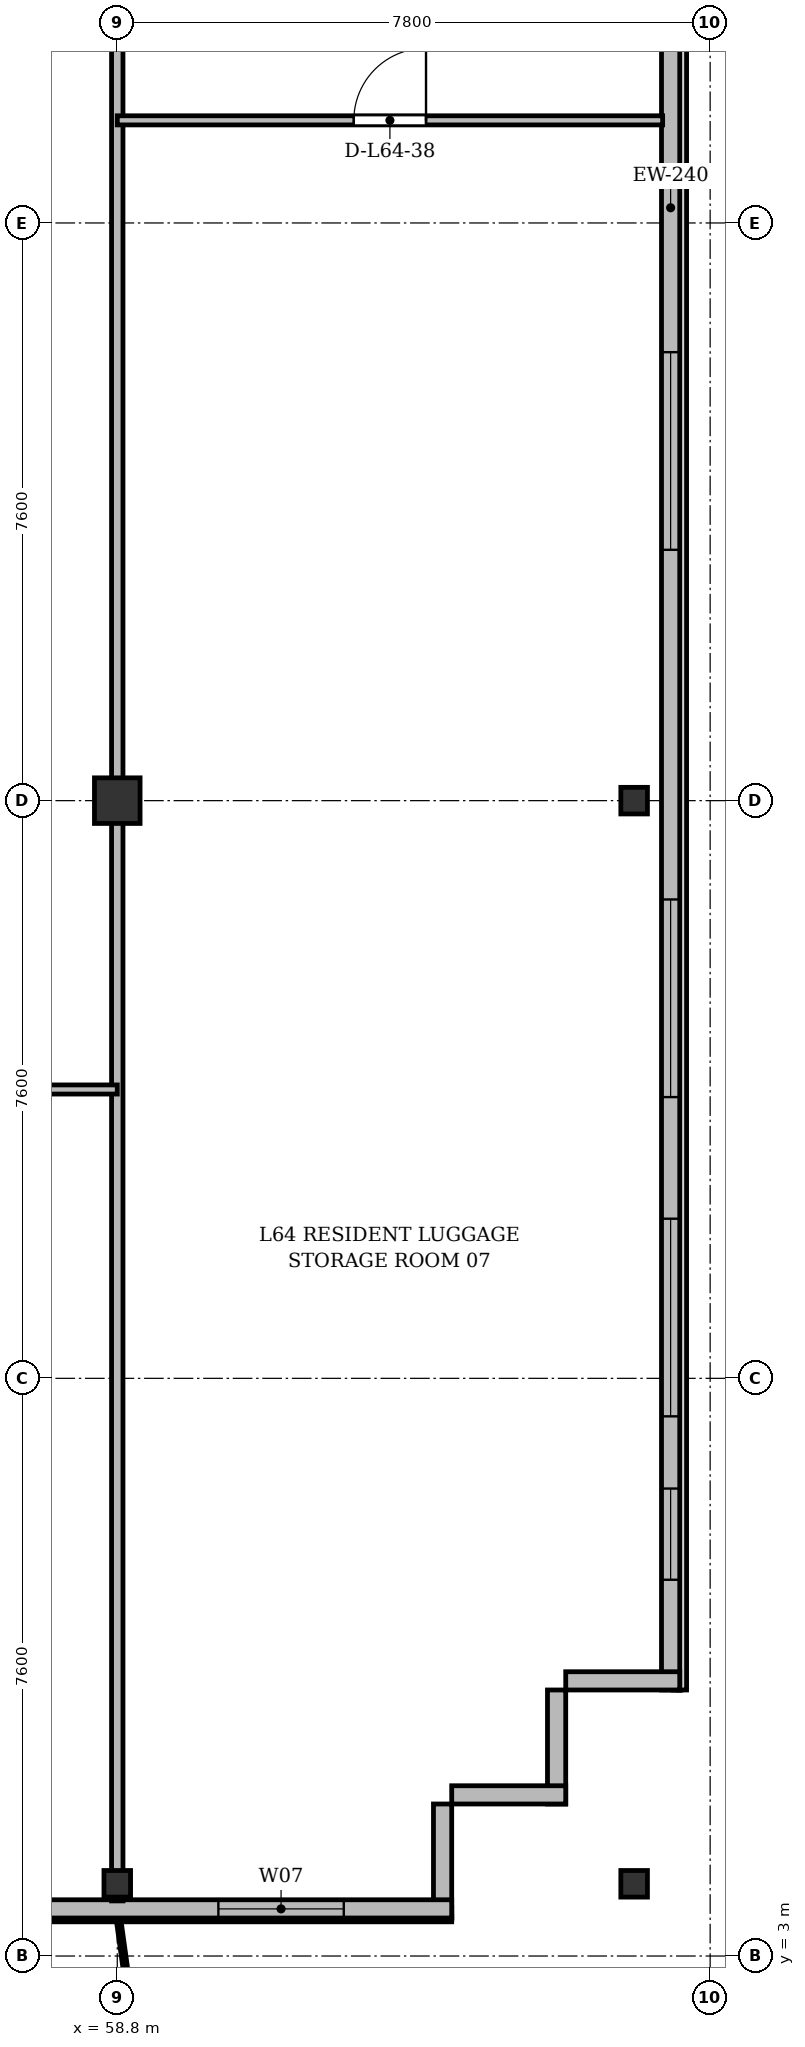
"""IFC4 building model, lengths in metres.
Left out: names, types, materials, properties, quantities, classifications, styles, units other than length and angle.
Written with IfcOpenShell. Run it as: python <this file> out.ifc"""

import sys

from ifc_helpers import new_model, si_unit, direction, frame, frame_2d, origin, origin_2d, place, context, subcontext, project, spatial, rectangle, i_section, extrude, source, transform, mapped, element, fill, save


model = new_model("IFC4")
c1 = context("Model", 3, precision=1e-05, world=origin(), true_north=direction((0.0, 1.0)))
c2 = subcontext(c1, "Body", "Model", "MODEL_VIEW")
j1 = project(units=[si_unit("LENGTHUNIT", "METRE"), si_unit("PLANEANGLEUNIT", "RADIAN")], contexts=[c1])
p1 = place(None, origin())
s1 = spatial("IfcSite", under=j1, at=p1, CompositionType="ELEMENT")
p2 = place(p1, origin())
s2 = spatial("IfcBuilding", under=s1, at=p2, CompositionType="ELEMENT")
p3 = place(p2, frame((0.0, 0.0, 248.7)))
s3 = spatial("IfcBuildingStorey", under=s2, at=p3, CompositionType="ELEMENT", Elevation=248.7)
m1 = source(origin(), c2, "Body", "SweptSolid", [
    extrude(i_section(OverallWidth=0.35, OverallDepth=0.35, WebThickness=0.018, FlangeThickness=0.028, at=origin_2d()), origin(), (0.0, 0.0, 1.0), 3.6),
])
p4 = place(p3, frame((58.8, 3.95, 0.0), z_axis=(0.0, 0.0, 1.0), x_axis=(1.0, 0.0, 0.0)))
e1 = element("IfcColumn", 1, at=p4, inside=s3, PredefinedType="COLUMN", context=c2, shape_type="MappedRepresentation", body=[
    mapped(m1, transform((0.0, 0.0, 0.0), x_axis=(1.0, 0.0, 0.0), y_axis=(0.0, 1.0, 0.0), z_axis=(0.0, 0.0, 1.0), scale=1.0)),
])
m2 = source(origin(), c2, "Body", "SweptSolid", [
    extrude(rectangle(XDim=0.6, YDim=0.6, at=origin_2d()), origin(), (0.0, 0.0, 1.0), 3.6),
])
p5 = place(p3, frame((58.8, 18.2, 0.0), z_axis=(0.0, 0.0, 1.0), x_axis=(1.0, 0.0, 0.0)))
e2 = element("IfcColumn", 2, at=p5, inside=s3, PredefinedType="COLUMN", context=c2, shape_type="MappedRepresentation", body=[
    mapped(m2, transform((0.0, 0.0, 0.0), x_axis=(1.0, 0.0, 0.0), y_axis=(0.0, 1.0, 0.0), z_axis=(0.0, 0.0, 1.0), scale=1.0)),
])
for number, where, z_axis, x_axis in (
    (3, (65.6, 3.95, 0.0), (0.0, 0.0, 1.0), (1.0, 0.0, 0.0)),
    (4, (65.6, 18.2, 0.0), (0.0, 0.0, 1.0), (1.0, 0.0, 0.0)),
):
    element("IfcColumn", number, at=place(p3, frame(where, z_axis=z_axis, x_axis=x_axis)), inside=s3, PredefinedType="COLUMN", context=c2, shape_type="MappedRepresentation", body=[
        mapped(m1, transform((0.0, 0.0, 0.0), x_axis=(1.0, 0.0, 0.0), y_axis=(0.0, 1.0, 0.0), z_axis=(0.0, 0.0, 1.0), scale=1.0)),
    ])
p6 = place(p3, frame((66.08, 45.5, 0.0), z_axis=(0.0, 0.0, 1.0), x_axis=(0.0, -1.0, 0.0)))
e5 = element("IfcWall", 5, at=p6, inside=s3, PredefinedType="SOLIDWALL", context=c2, shape_type="SweptSolid", body=[
    extrude(rectangle(XDim=39.0, YDim=0.24, at=frame_2d((19.5, 0.0))), origin(), (0.0, 0.0, 1.0), 3.37),
])
p7 = place(p6, frame((36.35, 0.0, 0.92)))
e6 = element("IfcOpeningElement", 6, at=p7, cuts=e5, PredefinedType="OPENING", context=c2, shape_type="SweptSolid", body=[
    extrude(rectangle(XDim=1.2, YDim=1.65, at=frame_2d((0.6, 0.825))), frame((0.0, 0.13, 0.0), z_axis=(0.0, -1.0, 0.0), x_axis=(1.0, 0.0, 0.0)), (0.0, 0.0, 1.0), 0.26),
])
p8 = place(p6, frame((32.8, 0.0, 0.92)))
e7 = element("IfcOpeningElement", 7, at=p8, cuts=e5, PredefinedType="OPENING", context=c2, shape_type="SweptSolid", body=[
    extrude(rectangle(XDim=2.6, YDim=1.9, at=frame_2d((1.3, 0.95))), frame((0.0, 0.13, 0.0), z_axis=(0.0, -1.0, 0.0), x_axis=(1.0, 0.0, 0.0)), (0.0, 0.0, 1.0), 0.26),
])
p9 = place(p6, frame((28.6, 0.0, 0.92)))
e8 = element("IfcOpeningElement", 8, at=p9, cuts=e5, PredefinedType="OPENING", context=c2, shape_type="SweptSolid", body=[
    extrude(rectangle(XDim=2.6, YDim=1.9, at=frame_2d((1.3, 0.95))), frame((0.0, 0.13, 0.0), z_axis=(0.0, -1.0, 0.0), x_axis=(1.0, 0.0, 0.0)), (0.0, 0.0, 1.0), 0.26),
])
p10 = place(p6, frame((21.4, 0.0, 0.92)))
e9 = element("IfcOpeningElement", 9, at=p10, cuts=e5, PredefinedType="OPENING", context=c2, shape_type="SweptSolid", body=[
    extrude(rectangle(XDim=2.6, YDim=1.9, at=frame_2d((1.3, 0.95))), frame((0.0, 0.13, 0.0), z_axis=(0.0, -1.0, 0.0), x_axis=(1.0, 0.0, 0.0)), (0.0, 0.0, 1.0), 0.26),
])
p11 = place(p6, frame((7.4, 0.0, 0.92)))
e10 = element("IfcOpeningElement", 10, at=p11, cuts=e5, PredefinedType="OPENING", context=c2, shape_type="SweptSolid", body=[
    extrude(rectangle(XDim=2.6, YDim=1.9, at=frame_2d((1.3, 0.95))), frame((0.0, 0.13, 0.0), z_axis=(0.0, -1.0, 0.0), x_axis=(1.0, 0.0, 0.0)), (0.0, 0.0, 1.0), 0.26),
])
p12 = place(p6, frame((4.5, 0.0, 0.92)))
e11 = element("IfcOpeningElement", 11, at=p12, cuts=e5, PredefinedType="OPENING", context=c2, shape_type="SweptSolid", body=[
    extrude(rectangle(XDim=1.2, YDim=1.65, at=frame_2d((0.6, 0.825))), frame((0.0, 0.13, 0.0), z_axis=(0.0, -1.0, 0.0), x_axis=(1.0, 0.0, 0.0)), (0.0, 0.0, 1.0), 0.26),
])
p13 = place(p6, frame((1.15, 0.0, 0.92)))
e12 = element("IfcOpeningElement", 12, at=p13, cuts=e5, PredefinedType="OPENING", context=c2, shape_type="SweptSolid", body=[
    extrude(rectangle(XDim=1.2, YDim=1.65, at=frame_2d((0.6, 0.825))), frame((0.0, 0.13, 0.0), z_axis=(0.0, -1.0, 0.0), x_axis=(1.0, 0.0, 0.0)), (0.0, 0.0, 1.0), 0.26),
])
p14 = place(p3, frame((66.2, 6.62, 0.0), z_axis=(0.0, 0.0, 1.0), x_axis=(-1.0, 0.0, 0.0)))
e13 = element("IfcWall", 13, at=p14, inside=s3, PredefinedType="SOLIDWALL", context=c2, shape_type="SweptSolid", body=[
    extrude(rectangle(XDim=1.5, YDim=0.24, at=frame_2d((0.75, 0.0))), origin(), (0.0, 0.0, 1.0), 2.87),
])
for number, where, z_axis, x_axis in (
    (14, (64.58, 6.5, 0.0), (0.0, 0.0, 1.0), (0.0, -1.0, 0.0)),
    (15, (64.7, 5.12, 0.0), (0.0, 0.0, 1.0), (-1.0, 0.0, 0.0)),
):
    element("IfcWall", number, at=place(p3, frame(where, z_axis=z_axis, x_axis=x_axis)), inside=s3, PredefinedType="SOLIDWALL", context=c2, shape_type="SweptSolid", body=[
        extrude(rectangle(XDim=1.5, YDim=0.24, at=frame_2d((0.75, 0.0))), origin(), (0.0, 0.0, 1.0), 3.37),
    ])
p15 = place(p3, frame((63.08, 5.0, 0.0), z_axis=(0.0, 0.0, 1.0), x_axis=(0.0, -1.0, 0.0)))
e16 = element("IfcWall", 16, at=p15, inside=s3, PredefinedType="SOLIDWALL", context=c2, shape_type="SweptSolid", body=[
    extrude(rectangle(XDim=1.5, YDim=0.24, at=frame_2d((0.75, 0.0))), origin(), (0.0, 0.0, 1.0), 2.92),
])
p16 = place(p3, frame((63.2, 3.62, 0.0), z_axis=(0.0, 0.0, 1.0), x_axis=(-1.0, 0.0, 0.0)))
e17 = element("IfcWall", 17, at=p16, inside=s3, PredefinedType="SOLIDWALL", context=c2, shape_type="SweptSolid", body=[
    extrude(rectangle(XDim=52.0, YDim=0.24, at=frame_2d((26.0, 0.0))), origin(), (0.0, 0.0, 1.0), 3.37),
])
p17 = place(p16, frame((1.42, 0.0, 0.9)))
e18 = element("IfcOpeningElement", 18, at=p17, cuts=e17, PredefinedType="OPENING", context=c2, shape_type="SweptSolid", body=[
    extrude(rectangle(XDim=1.65, YDim=1.85, at=frame_2d((0.825, 0.925))), frame((0.0, 0.13, 0.0), z_axis=(0.0, -1.0, 0.0), x_axis=(1.0, 0.0, 0.0)), (0.0, 0.0, 1.0), 0.26),
])
p18 = place(p16, frame((7.4, 0.0, 0.9)))
e19 = element("IfcOpeningElement", 19, at=p18, cuts=e17, PredefinedType="OPENING", context=c2, shape_type="SweptSolid", body=[
    extrude(rectangle(XDim=1.8, YDim=1.8, at=frame_2d((0.9, 0.9))), frame((0.0, 0.13, 0.0), z_axis=(0.0, -1.0, 0.0), x_axis=(1.0, 0.0, 0.0)), (0.0, 0.0, 1.0), 0.26),
])
p19 = place(p16, frame((14.017, 0.0, 0.0)))
e20 = element("IfcOpeningElement", 20, at=p19, cuts=e17, PredefinedType="OPENING", context=c2, shape_type="SweptSolid", body=[
    extrude(rectangle(XDim=1.2, YDim=2.2, at=frame_2d((0.6, 1.1))), frame((0.0, 0.13, 0.0), z_axis=(0.0, -1.0, 0.0), x_axis=(1.0, 0.0, 0.0)), (0.0, 0.0, 1.0), 0.26),
])
p20 = place(p16, frame((25.25, 0.0, 0.9)))
e21 = element("IfcOpeningElement", 21, at=p20, cuts=e17, PredefinedType="OPENING", context=c2, shape_type="SweptSolid", body=[
    extrude(rectangle(XDim=1.5, YDim=1.75, at=frame_2d((0.75, 0.875))), frame((0.0, 0.13, 0.0), z_axis=(0.0, -1.0, 0.0), x_axis=(1.0, 0.0, 0.0)), (0.0, 0.0, 1.0), 0.26),
])
p21 = place(p16, frame((35.2, 0.0, 0.9)))
e22 = element("IfcOpeningElement", 22, at=p21, cuts=e17, PredefinedType="OPENING", context=c2, shape_type="SweptSolid", body=[
    extrude(rectangle(XDim=2.0, YDim=1.95, at=frame_2d((1.0, 0.975))), frame((0.0, 0.13, 0.0), z_axis=(0.0, -1.0, 0.0), x_axis=(1.0, 0.0, 0.0)), (0.0, 0.0, 1.0), 0.26),
])
p22 = place(p16, frame((45.302, 0.0, 0.0)))
e23 = element("IfcOpeningElement", 23, at=p22, cuts=e17, PredefinedType="OPENING", context=c2, shape_type="SweptSolid", body=[
    extrude(rectangle(XDim=1.2, YDim=2.2, at=frame_2d((0.6, 1.1))), frame((0.0, 0.13, 0.0), z_axis=(0.0, -1.0, 0.0), x_axis=(1.0, 0.0, 0.0)), (0.0, 0.0, 1.0), 0.26),
])
p23 = place(p16, frame((48.855, 0.0, 0.9)))
e24 = element("IfcOpeningElement", 24, at=p23, cuts=e17, PredefinedType="OPENING", context=c2, shape_type="SweptSolid", body=[
    extrude(rectangle(XDim=1.8, YDim=1.8, at=frame_2d((0.9, 0.9))), frame((0.0, 0.13, 0.0), z_axis=(0.0, -1.0, 0.0), x_axis=(1.0, 0.0, 0.0)), (0.0, 0.0, 1.0), 0.26),
])
p24 = place(p3, frame((58.8, 3.725, 0.0), z_axis=(0.0, 0.0, 1.0), x_axis=(0.0, 1.0, 0.0)))
e25 = element("IfcWall", 25, at=p24, inside=s3, PredefinedType="PARTITIONING", context=c2, shape_type="SweptSolid", body=[
    extrude(rectangle(XDim=27.275, YDim=0.15, at=frame_2d((13.637, 0.0))), origin(), (0.0, 0.0, 1.0), 2.87),
])
p25 = place(p3, frame((51.0, 14.4, 0.0), z_axis=(0.0, 0.0, 1.0), x_axis=(1.0, 0.0, 0.0)))
e26 = element("IfcWall", 26, at=p25, inside=s3, PredefinedType="PARTITIONING", context=c2, shape_type="SweptSolid", body=[
    extrude(rectangle(XDim=7.8, YDim=0.12, at=frame_2d((3.9, 0.0))), origin(), (0.0, 0.0, 1.0), 2.87),
])
p26 = place(p25, frame((3.333, 0.0, 0.0)))
e27 = element("IfcOpeningElement", 27, at=p26, cuts=e26, PredefinedType="OPENING", context=c2, shape_type="SweptSolid", body=[
    extrude(rectangle(XDim=0.95, YDim=2.15, at=frame_2d((0.475, 1.075))), frame((0.0, 0.07, 0.0), z_axis=(0.0, -1.0, 0.0), x_axis=(1.0, 0.0, 0.0)), (0.0, 0.0, 1.0), 0.14),
])
p27 = place(p3, frame((58.8, 27.15, 0.0), z_axis=(0.0, 0.0, 1.0), x_axis=(1.0, 0.0, 0.0)))
e28 = element("IfcWall", 28, at=p27, inside=s3, PredefinedType="PARTITIONING", context=c2, shape_type="SweptSolid", body=[
    extrude(rectangle(XDim=7.175, YDim=0.12, at=frame_2d((3.587, 0.0))), origin(), (0.0, 0.0, 1.0), 2.87),
])
p28 = place(p27, frame((3.112, 0.0, 0.0)))
e29 = element("IfcOpeningElement", 29, at=p28, cuts=e28, PredefinedType="OPENING", context=c2, shape_type="SweptSolid", body=[
    extrude(rectangle(XDim=0.95, YDim=2.15, at=frame_2d((0.475, 1.075))), frame((0.0, 0.07, 0.0), z_axis=(0.0, -1.0, 0.0), x_axis=(1.0, 0.0, 0.0)), (0.0, 0.0, 1.0), 0.14),
])
m3 = source(origin(), c2, "Body", "SweptSolid", [
    extrude(rectangle(XDim=1.2, YDim=1.65, at=frame_2d((0.6, 0.825))), frame((0.0, 0.03, 0.0), z_axis=(0.0, -1.0, 0.0), x_axis=(1.0, 0.0, 0.0)), (0.0, 0.0, 1.0), 0.06),
])
p29 = place(p7, origin())
e30 = element("IfcWindow", 30, at=p29, inside=s3, PartitioningType="SINGLE_PANEL", PredefinedType="WINDOW", context=c2, shape_type="MappedRepresentation", body=[
    mapped(m3, transform((0.0, 0.0, 0.0), x_axis=(1.0, 0.0, 0.0), y_axis=(0.0, 1.0, 0.0), z_axis=(0.0, 0.0, 1.0), scale=1.0)),
])
fill(e6, e30)
m4 = source(origin(), c2, "Body", "SweptSolid", [
    extrude(rectangle(XDim=2.6, YDim=1.9, at=frame_2d((1.3, 0.95))), frame((0.0, 0.03, 0.0), z_axis=(0.0, -1.0, 0.0), x_axis=(1.0, 0.0, 0.0)), (0.0, 0.0, 1.0), 0.06),
])
p30 = place(p8, origin())
e31 = element("IfcWindow", 31, at=p30, inside=s3, PartitioningType="SINGLE_PANEL", PredefinedType="WINDOW", context=c2, shape_type="MappedRepresentation", body=[
    mapped(m4, transform((0.0, 0.0, 0.0), x_axis=(1.0, 0.0, 0.0), y_axis=(0.0, 1.0, 0.0), z_axis=(0.0, 0.0, 1.0), scale=1.0)),
])
fill(e7, e31)
p31 = place(p9, origin())
e32 = element("IfcWindow", 32, at=p31, inside=s3, PartitioningType="SINGLE_PANEL", PredefinedType="WINDOW", context=c2, shape_type="MappedRepresentation", body=[
    mapped(m4, transform((0.0, 0.0, 0.0), x_axis=(1.0, 0.0, 0.0), y_axis=(0.0, 1.0, 0.0), z_axis=(0.0, 0.0, 1.0), scale=1.0)),
])
fill(e8, e32)
p32 = place(p10, origin())
e33 = element("IfcWindow", 33, at=p32, inside=s3, PartitioningType="SINGLE_PANEL", PredefinedType="WINDOW", context=c2, shape_type="MappedRepresentation", body=[
    mapped(m4, transform((0.0, 0.0, 0.0), x_axis=(1.0, 0.0, 0.0), y_axis=(0.0, 1.0, 0.0), z_axis=(0.0, 0.0, 1.0), scale=1.0)),
])
fill(e9, e33)
m5 = source(origin(), c2, "Body", "SweptSolid", [
    extrude(rectangle(XDim=1.65, YDim=1.85, at=frame_2d((0.825, 0.925))), frame((0.0, 0.03, 0.0), z_axis=(0.0, -1.0, 0.0), x_axis=(1.0, 0.0, 0.0)), (0.0, 0.0, 1.0), 0.06),
])
p33 = place(p17, origin())
e34 = element("IfcWindow", 34, at=p33, inside=s3, PartitioningType="SINGLE_PANEL", PredefinedType="WINDOW", context=c2, shape_type="MappedRepresentation", body=[
    mapped(m5, transform((0.0, 0.0, 0.0), x_axis=(1.0, 0.0, 0.0), y_axis=(0.0, 1.0, 0.0), z_axis=(0.0, 0.0, 1.0), scale=1.0)),
])
fill(e18, e34)
m6 = source(origin(), c2, "Body", "SweptSolid", [
    extrude(rectangle(XDim=0.95, YDim=2.15, at=frame_2d((0.475, 1.075))), frame((0.0, 0.025, 0.0), z_axis=(0.0, -1.0, 0.0), x_axis=(1.0, 0.0, 0.0)), (0.0, 0.0, 1.0), 0.05),
])
p34 = place(p28, origin())
e35 = element("IfcDoor", 35, at=p34, inside=s3, OperationType="SINGLE_SWING_RIGHT", PredefinedType="DOOR", context=c2, shape_type="MappedRepresentation", body=[
    mapped(m6, transform((0.0, 0.0, 0.0), x_axis=(1.0, 0.0, 0.0), y_axis=(0.0, 1.0, 0.0), z_axis=(0.0, 0.0, 1.0), scale=1.0)),
])
fill(e29, e35)
save(model, sys.argv[1])
